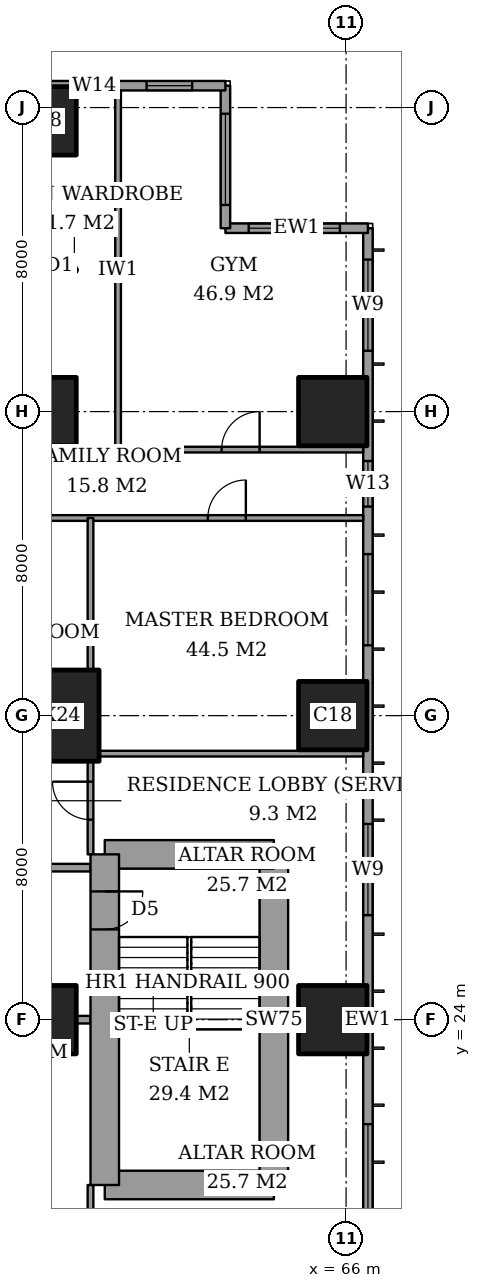
"""IFC4 building model, lengths in metres.
Left out: names, types, materials, properties, quantities, classifications, styles, units other than length and angle.
Written with IfcOpenShell. Run it as: python <this file> out.ifc"""

import sys

from ifc_helpers import new_model, si_unit, direction, frame, frame_2d, origin, origin_2d, place, context, subcontext, project, spatial, rectangle, extrude, element, fill, save


model = new_model("IFC4")
c1 = context("Model", 3, precision=1e-05, world=origin(), true_north=direction((0.0, 1.0)))
c2 = subcontext(c1, "Body", "Model", "MODEL_VIEW")
j1 = project(units=[si_unit("LENGTHUNIT", "METRE"), si_unit("PLANEANGLEUNIT", "RADIAN")], contexts=[c1])
p1 = place(None, origin())
s1 = spatial("IfcSite", under=j1, at=p1, CompositionType="ELEMENT")
p2 = place(p1, origin())
s2 = spatial("IfcBuilding", under=s1, at=p2, CompositionType="ELEMENT")
p3 = place(p2, frame((0.0, 0.0, 207.4)))
s3 = spatial("IfcBuildingStorey", under=s2, at=p3, CompositionType="ELEMENT", Elevation=207.4)
p4 = place(p3, frame((58.0, 24.0, 0.0), z_axis=(0.0, 0.0, 1.0), x_axis=(1.0, 0.0, 0.0)))
e1 = element("IfcColumn", 1, at=p4, inside=s3, PredefinedType="COLUMN", context=c2, shape_type="SweptSolid", body=[
    extrude(rectangle(XDim=1.8, YDim=1.8, at=origin_2d()), origin(), (0.0, 0.0, 1.0), 3.6),
])
p5 = place(p3, frame((58.0, 32.0, 0.0), z_axis=(0.0, 0.0, 1.0), x_axis=(1.0, 0.0, 0.0)))
e2 = element("IfcColumn", 2, at=p5, inside=s3, PredefinedType="COLUMN", context=c2, shape_type="SweptSolid", body=[
    extrude(rectangle(XDim=3.0, YDim=2.4, at=origin_2d()), origin(), (0.0, 0.0, 1.0), 3.6),
])
for number, where, z_axis, x_axis in (
    (3, (58.0, 40.0, 0.0), (0.0, 0.0, 1.0), (1.0, 0.0, 0.0)),
    (4, (58.0, 47.65, 0.0), (0.0, 0.0, 1.0), (1.0, 0.0, 0.0)),
    (5, (65.65, 24.0, 0.0), (0.0, 0.0, 1.0), (1.0, 0.0, 0.0)),
    (6, (65.65, 32.0, 0.0), (0.0, 0.0, 1.0), (1.0, 0.0, 0.0)),
    (7, (65.65, 40.0, 0.0), (0.0, 0.0, 1.0), (1.0, 0.0, 0.0)),
):
    element("IfcColumn", number, at=place(p3, frame(where, z_axis=z_axis, x_axis=x_axis)), inside=s3, PredefinedType="COLUMN", context=c2, shape_type="SweptSolid", body=[
        extrude(rectangle(XDim=1.8, YDim=1.8, at=origin_2d()), origin(), (0.0, 0.0, 1.0), 3.6),
    ])
p6 = place(p3, frame((59.65, 19.65, 0.0), z_axis=(0.0, 0.0, 1.0), x_axis=(1.0, 0.0, 0.0)))
e8 = element("IfcWall", 8, at=p6, inside=s3, PredefinedType="SHEAR", context=c2, shape_type="SweptSolid", body=[
    extrude(rectangle(XDim=4.45, YDim=0.75, at=frame_2d((2.225, 0.0))), origin(), (0.0, 0.0, 1.0), 3.6),
])
p7 = place(p3, frame((64.1, 19.65, 0.0), z_axis=(0.0, 0.0, 1.0), x_axis=(0.0, 1.0, 0.0)))
e9 = element("IfcWall", 9, at=p7, inside=s3, PredefinedType="SHEAR", context=c2, shape_type="SweptSolid", body=[
    extrude(rectangle(XDim=8.7, YDim=0.75, at=frame_2d((4.35, 0.0))), origin(), (0.0, 0.0, 1.0), 3.6),
])
p8 = place(p3, frame((64.1, 28.35, 0.0), z_axis=(0.0, 0.0, 1.0), x_axis=(-1.0, 0.0, 0.0)))
e10 = element("IfcWall", 10, at=p8, inside=s3, PredefinedType="SHEAR", context=c2, shape_type="SweptSolid", body=[
    extrude(rectangle(XDim=4.45, YDim=0.75, at=frame_2d((2.225, 0.0))), origin(), (0.0, 0.0, 1.0), 3.6),
])
p9 = place(p3, frame((59.65, 28.35, 0.0), z_axis=(0.0, 0.0, 1.0), x_axis=(0.0, -1.0, 0.0)))
e11 = element("IfcWall", 11, at=p9, inside=s3, PredefinedType="SHEAR", context=c2, shape_type="SweptSolid", body=[
    extrude(rectangle(XDim=8.7, YDim=0.75, at=frame_2d((4.35, 0.0))), origin(), (0.0, 0.0, 1.0), 3.6),
])
p10 = place(p9, frame((0.975, 0.0, 0.0)))
e12 = element("IfcOpeningElement", 12, at=p10, cuts=e11, PredefinedType="OPENING", context=c2, shape_type="SweptSolid", body=[
    extrude(rectangle(XDim=1.0, YDim=2.1, at=frame_2d((0.5, 1.05))), frame((0.0, 0.385, 0.0), z_axis=(0.0, -1.0, 0.0), x_axis=(1.0, 0.0, 0.0)), (0.0, 0.0, 1.0), 0.77),
])
p11 = place(p3, frame((66.575, 3.175, 0.0), z_axis=(0.0, 0.0, 1.0), x_axis=(0.0, 1.0, 0.0)))
e13 = element("IfcWall", 13, at=p11, inside=s3, PredefinedType="SOLIDWALL", context=c2, shape_type="SweptSolid", body=[
    extrude(rectangle(XDim=41.65, YDim=0.25, at=frame_2d((20.825, 0.0))), origin(), (0.0, 0.0, 1.0), 3.6),
])
p12 = place(p11, frame((0.825, 0.0, 0.2)))
e14 = element("IfcOpeningElement", 14, at=p12, cuts=e13, PredefinedType="OPENING", context=c2, shape_type="SweptSolid", body=[
    extrude(rectangle(XDim=2.4, YDim=2.4, at=frame_2d((1.2, 1.2))), frame((0.0, 0.135, 0.0), z_axis=(0.0, -1.0, 0.0), x_axis=(1.0, 0.0, 0.0)), (0.0, 0.0, 1.0), 0.27),
])
p13 = place(p11, frame((6.6, 0.0, 0.2)))
e15 = element("IfcOpeningElement", 15, at=p13, cuts=e13, PredefinedType="OPENING", context=c2, shape_type="SweptSolid", body=[
    extrude(rectangle(XDim=1.2, YDim=2.4, at=frame_2d((0.6, 1.2))), frame((0.0, 0.135, 0.0), z_axis=(0.0, -1.0, 0.0), x_axis=(1.0, 0.0, 0.0)), (0.0, 0.0, 1.0), 0.27),
])
p14 = place(p11, frame((8.775, 0.0, 0.2)))
e16 = element("IfcOpeningElement", 16, at=p14, cuts=e13, PredefinedType="OPENING", context=c2, shape_type="SweptSolid", body=[
    extrude(rectangle(XDim=2.4, YDim=2.4, at=frame_2d((1.2, 1.2))), frame((0.0, 0.135, 0.0), z_axis=(0.0, -1.0, 0.0), x_axis=(1.0, 0.0, 0.0)), (0.0, 0.0, 1.0), 0.27),
])
p15 = place(p11, frame((15.675, 0.0, 0.2)))
e17 = element("IfcOpeningElement", 17, at=p15, cuts=e13, PredefinedType="OPENING", context=c2, shape_type="SweptSolid", body=[
    extrude(rectangle(XDim=2.4, YDim=2.4, at=frame_2d((1.2, 1.2))), frame((0.0, 0.135, 0.0), z_axis=(0.0, -1.0, 0.0), x_axis=(1.0, 0.0, 0.0)), (0.0, 0.0, 1.0), 0.27),
])
p16 = place(p11, frame((23.575, 0.0, 0.2)))
e18 = element("IfcOpeningElement", 18, at=p16, cuts=e13, PredefinedType="OPENING", context=c2, shape_type="SweptSolid", body=[
    extrude(rectangle(XDim=2.4, YDim=2.4, at=frame_2d((1.2, 1.2))), frame((0.0, 0.135, 0.0), z_axis=(0.0, -1.0, 0.0), x_axis=(1.0, 0.0, 0.0)), (0.0, 0.0, 1.0), 0.27),
])
p17 = place(p11, frame((30.675, 0.0, 0.2)))
e19 = element("IfcOpeningElement", 19, at=p17, cuts=e13, PredefinedType="OPENING", context=c2, shape_type="SweptSolid", body=[
    extrude(rectangle(XDim=2.4, YDim=2.4, at=frame_2d((1.2, 1.2))), frame((0.0, 0.135, 0.0), z_axis=(0.0, -1.0, 0.0), x_axis=(1.0, 0.0, 0.0)), (0.0, 0.0, 1.0), 0.27),
])
p18 = place(p11, frame((34.325, 0.0, 0.2)))
e20 = element("IfcOpeningElement", 20, at=p18, cuts=e13, PredefinedType="OPENING", context=c2, shape_type="SweptSolid", body=[
    extrude(rectangle(XDim=1.2, YDim=2.4, at=frame_2d((0.6, 1.2))), frame((0.0, 0.135, 0.0), z_axis=(0.0, -1.0, 0.0), x_axis=(1.0, 0.0, 0.0)), (0.0, 0.0, 1.0), 0.27),
])
p19 = place(p11, frame((38.425, 0.0, 0.2)))
e21 = element("IfcOpeningElement", 21, at=p19, cuts=e13, PredefinedType="OPENING", context=c2, shape_type="SweptSolid", body=[
    extrude(rectangle(XDim=2.4, YDim=2.4, at=frame_2d((1.2, 1.2))), frame((0.0, 0.135, 0.0), z_axis=(0.0, -1.0, 0.0), x_axis=(1.0, 0.0, 0.0)), (0.0, 0.0, 1.0), 0.27),
])
p20 = place(p3, frame((66.575, 44.825, 0.0), z_axis=(0.0, 0.0, 1.0), x_axis=(-1.0, 0.0, 0.0)))
e22 = element("IfcWall", 22, at=p20, inside=s3, PredefinedType="SOLIDWALL", context=c2, shape_type="SweptSolid", body=[
    extrude(rectangle(XDim=3.75, YDim=0.25, at=frame_2d((1.875, 0.0))), origin(), (0.0, 0.0, 1.0), 3.6),
])
p21 = place(p20, frame((0.738, 0.0, 0.2)))
e23 = element("IfcOpeningElement", 23, at=p21, cuts=e22, PredefinedType="OPENING", context=c2, shape_type="SweptSolid", body=[
    extrude(rectangle(XDim=2.4, YDim=2.4, at=frame_2d((1.2, 1.2))), frame((0.0, 0.135, 0.0), z_axis=(0.0, -1.0, 0.0), x_axis=(1.0, 0.0, 0.0)), (0.0, 0.0, 1.0), 0.27),
])
p22 = place(p3, frame((62.825, 44.825, 0.0), z_axis=(0.0, 0.0, 1.0), x_axis=(0.0, 1.0, 0.0)))
e24 = element("IfcWall", 24, at=p22, inside=s3, PredefinedType="SOLIDWALL", context=c2, shape_type="SweptSolid", body=[
    extrude(rectangle(XDim=3.75, YDim=0.25, at=frame_2d((1.875, 0.0))), origin(), (0.0, 0.0, 1.0), 3.6),
])
p23 = place(p22, frame((0.613, 0.0, 0.2)))
e25 = element("IfcOpeningElement", 25, at=p23, cuts=e24, PredefinedType="OPENING", context=c2, shape_type="SweptSolid", body=[
    extrude(rectangle(XDim=2.4, YDim=2.4, at=frame_2d((1.2, 1.2))), frame((0.0, 0.135, 0.0), z_axis=(0.0, -1.0, 0.0), x_axis=(1.0, 0.0, 0.0)), (0.0, 0.0, 1.0), 0.27),
])
p24 = place(p3, frame((62.825, 48.575, 0.0), z_axis=(0.0, 0.0, 1.0), x_axis=(-1.0, 0.0, 0.0)))
e26 = element("IfcWall", 26, at=p24, inside=s3, PredefinedType="SOLIDWALL", context=c2, shape_type="SweptSolid", body=[
    extrude(rectangle(XDim=21.4, YDim=0.25, at=frame_2d((10.7, 0.0))), origin(), (0.0, 0.0, 1.0), 3.6),
])
p25 = place(p24, frame((0.875, 0.0, 0.2)))
e27 = element("IfcOpeningElement", 27, at=p25, cuts=e26, PredefinedType="OPENING", context=c2, shape_type="SweptSolid", body=[
    extrude(rectangle(XDim=1.2, YDim=2.4, at=frame_2d((0.6, 1.2))), frame((0.0, 0.135, 0.0), z_axis=(0.0, -1.0, 0.0), x_axis=(1.0, 0.0, 0.0)), (0.0, 0.0, 1.0), 0.27),
])
p26 = place(p24, frame((3.15, 0.0, 0.2)))
e28 = element("IfcOpeningElement", 28, at=p26, cuts=e26, PredefinedType="OPENING", context=c2, shape_type="SweptSolid", body=[
    extrude(rectangle(XDim=0.6, YDim=2.4, at=frame_2d((0.3, 1.2))), frame((0.0, 0.135, 0.0), z_axis=(0.0, -1.0, 0.0), x_axis=(1.0, 0.0, 0.0)), (0.0, 0.0, 1.0), 0.27),
])
p27 = place(p24, frame((6.575, 0.0, 0.2)))
e29 = element("IfcOpeningElement", 29, at=p27, cuts=e26, PredefinedType="OPENING", context=c2, shape_type="SweptSolid", body=[
    extrude(rectangle(XDim=2.4, YDim=2.4, at=frame_2d((1.2, 1.2))), frame((0.0, 0.135, 0.0), z_axis=(0.0, -1.0, 0.0), x_axis=(1.0, 0.0, 0.0)), (0.0, 0.0, 1.0), 0.27),
])
p28 = place(p24, frame((10.275, 0.0, 0.2)))
e30 = element("IfcOpeningElement", 30, at=p28, cuts=e26, PredefinedType="OPENING", context=c2, shape_type="SweptSolid", body=[
    extrude(rectangle(XDim=1.2, YDim=2.4, at=frame_2d((0.6, 1.2))), frame((0.0, 0.135, 0.0), z_axis=(0.0, -1.0, 0.0), x_axis=(1.0, 0.0, 0.0)), (0.0, 0.0, 1.0), 0.27),
])
p29 = place(p24, frame((14.425, 0.0, 0.2)))
e31 = element("IfcOpeningElement", 31, at=p29, cuts=e26, PredefinedType="OPENING", context=c2, shape_type="SweptSolid", body=[
    extrude(rectangle(XDim=2.4, YDim=2.4, at=frame_2d((1.2, 1.2))), frame((0.0, 0.135, 0.0), z_axis=(0.0, -1.0, 0.0), x_axis=(1.0, 0.0, 0.0)), (0.0, 0.0, 1.0), 0.27),
])
p30 = place(p24, frame((17.9, 0.0, 0.2)))
e32 = element("IfcOpeningElement", 32, at=p30, cuts=e26, PredefinedType="OPENING", context=c2, shape_type="SweptSolid", body=[
    extrude(rectangle(XDim=1.2, YDim=2.4, at=frame_2d((0.6, 1.2))), frame((0.0, 0.135, 0.0), z_axis=(0.0, -1.0, 0.0), x_axis=(1.0, 0.0, 0.0)), (0.0, 0.0, 1.0), 0.27),
])
p31 = place(p3, frame((58.9, 24.0, 0.0), z_axis=(0.0, 0.0, 1.0), x_axis=(1.0, 0.0, 0.0)))
e33 = element("IfcWall", 33, at=p31, inside=s3, PredefinedType="PARTITIONING", context=c2, shape_type="SweptSolid", body=[
    extrude(rectangle(XDim=0.375, YDim=0.2, at=frame_2d((0.188, 0.0))), origin(), (0.0, 0.0, 1.0), 3.35),
])
p32 = place(p3, frame((42.0, 28.0, 0.0), z_axis=(0.0, 0.0, 1.0), x_axis=(1.0, 0.0, 0.0)))
e34 = element("IfcWall", 34, at=p32, inside=s3, PredefinedType="PARTITIONING", context=c2, shape_type="SweptSolid", body=[
    extrude(rectangle(XDim=17.275, YDim=0.2, at=frame_2d((8.637, 0.0))), origin(), (0.0, 0.0, 1.0), 3.35),
])
p33 = place(p32, frame((9.4, 0.0, 0.0)))
e35 = element("IfcOpeningElement", 35, at=p33, cuts=e34, PredefinedType="OPENING", context=c2, shape_type="SweptSolid", body=[
    extrude(rectangle(XDim=1.2, YDim=2.4, at=frame_2d((0.6, 1.2))), frame((0.0, 0.11, 0.0), z_axis=(0.0, -1.0, 0.0), x_axis=(1.0, 0.0, 0.0)), (0.0, 0.0, 1.0), 0.22),
])
p34 = place(p3, frame((59.5, 31.0, 0.0), z_axis=(0.0, 0.0, 1.0), x_axis=(1.0, 0.0, 0.0)))
e36 = element("IfcWall", 36, at=p34, inside=s3, PredefinedType="PARTITIONING", context=c2, shape_type="SweptSolid", body=[
    extrude(rectangle(XDim=6.95, YDim=0.15, at=frame_2d((3.475, 0.0))), origin(), (0.0, 0.0, 1.0), 3.35),
])
p35 = place(p3, frame((41.439, 37.2, 0.0), z_axis=(0.0, 0.0, 1.0), x_axis=(1.0, 0.0, 0.0)))
e37 = element("IfcWall", 37, at=p35, inside=s3, PredefinedType="PARTITIONING", context=c2, shape_type="SweptSolid", body=[
    extrude(rectangle(XDim=25.011, YDim=0.15, at=frame_2d((12.505, 0.0))), origin(), (0.0, 0.0, 1.0), 3.35),
])
p36 = place(p35, frame((10.761, 0.0, 0.0)))
e38 = element("IfcOpeningElement", 38, at=p36, cuts=e37, PredefinedType="OPENING", context=c2, shape_type="SweptSolid", body=[
    extrude(rectangle(XDim=1.0, YDim=2.1, at=frame_2d((0.5, 1.05))), frame((0.0, 0.085, 0.0), z_axis=(0.0, -1.0, 0.0), x_axis=(1.0, 0.0, 0.0)), (0.0, 0.0, 1.0), 0.17),
])
p37 = place(p35, frame((20.924, 0.0, 0.0)))
e39 = element("IfcOpeningElement", 39, at=p37, cuts=e37, PredefinedType="OPENING", context=c2, shape_type="SweptSolid", body=[
    extrude(rectangle(XDim=1.0, YDim=2.1, at=frame_2d((0.5, 1.05))), frame((0.0, 0.085, 0.0), z_axis=(0.0, -1.0, 0.0), x_axis=(1.0, 0.0, 0.0)), (0.0, 0.0, 1.0), 0.17),
])
p38 = place(p35, frame((15.749, 0.0, 0.0)))
e40 = element("IfcOpeningElement", 40, at=p38, cuts=e37, PredefinedType="OPENING", context=c2, shape_type="SweptSolid", body=[
    extrude(rectangle(XDim=0.9, YDim=2.1, at=frame_2d((0.45, 1.05))), frame((0.0, 0.085, 0.0), z_axis=(0.0, -1.0, 0.0), x_axis=(1.0, 0.0, 0.0)), (0.0, 0.0, 1.0), 0.17),
])
p39 = place(p35, frame((12.961, 0.0, 0.0)))
e41 = element("IfcOpeningElement", 41, at=p39, cuts=e37, PredefinedType="OPENING", context=c2, shape_type="SweptSolid", body=[
    extrude(rectangle(XDim=1.0, YDim=2.1, at=frame_2d((0.5, 1.05))), frame((0.0, 0.085, 0.0), z_axis=(0.0, -1.0, 0.0), x_axis=(1.0, 0.0, 0.0)), (0.0, 0.0, 1.0), 0.17),
])
p40 = place(p35, frame((7.911, 0.0, 0.0)))
e42 = element("IfcOpeningElement", 42, at=p40, cuts=e37, PredefinedType="OPENING", context=c2, shape_type="SweptSolid", body=[
    extrude(rectangle(XDim=0.9, YDim=2.1, at=frame_2d((0.45, 1.05))), frame((0.0, 0.085, 0.0), z_axis=(0.0, -1.0, 0.0), x_axis=(1.0, 0.0, 0.0)), (0.0, 0.0, 1.0), 0.17),
])
p41 = place(p35, frame((2.836, 0.0, 0.0)))
e43 = element("IfcOpeningElement", 43, at=p41, cuts=e37, PredefinedType="OPENING", context=c2, shape_type="SweptSolid", body=[
    extrude(rectangle(XDim=1.0, YDim=2.1, at=frame_2d((0.5, 1.05))), frame((0.0, 0.085, 0.0), z_axis=(0.0, -1.0, 0.0), x_axis=(1.0, 0.0, 0.0)), (0.0, 0.0, 1.0), 0.17),
])
p42 = place(p3, frame((51.2, 39.0, 0.0), z_axis=(0.0, 0.0, 1.0), x_axis=(1.0, 0.0, 0.0)))
e44 = element("IfcWall", 44, at=p42, inside=s3, PredefinedType="PARTITIONING", context=c2, shape_type="SweptSolid", body=[
    extrude(rectangle(XDim=15.25, YDim=0.15, at=frame_2d((7.625, 0.0))), origin(), (0.0, 0.0, 1.0), 3.35),
])
p43 = place(p42, frame((11.525, 0.0, 0.0)))
e45 = element("IfcOpeningElement", 45, at=p43, cuts=e44, PredefinedType="OPENING", context=c2, shape_type="SweptSolid", body=[
    extrude(rectangle(XDim=1.0, YDim=2.1, at=frame_2d((0.5, 1.05))), frame((0.0, 0.085, 0.0), z_axis=(0.0, -1.0, 0.0), x_axis=(1.0, 0.0, 0.0)), (0.0, 0.0, 1.0), 0.17),
])
p44 = place(p42, frame((4.75, 0.0, 0.0)))
e46 = element("IfcOpeningElement", 46, at=p44, cuts=e44, PredefinedType="OPENING", context=c2, shape_type="SweptSolid", body=[
    extrude(rectangle(XDim=1.0, YDim=2.1, at=frame_2d((0.5, 1.05))), frame((0.0, 0.085, 0.0), z_axis=(0.0, -1.0, 0.0), x_axis=(1.0, 0.0, 0.0)), (0.0, 0.0, 1.0), 0.17),
])
p45 = place(p42, frame((0.4, 0.0, 0.0)))
e47 = element("IfcOpeningElement", 47, at=p45, cuts=e44, PredefinedType="OPENING", context=c2, shape_type="SweptSolid", body=[
    extrude(rectangle(XDim=1.0, YDim=2.1, at=frame_2d((0.5, 1.05))), frame((0.0, 0.085, 0.0), z_axis=(0.0, -1.0, 0.0), x_axis=(1.0, 0.0, 0.0)), (0.0, 0.0, 1.0), 0.17),
])
p46 = place(p3, frame((59.275, 17.2, 0.0), z_axis=(0.0, 0.0, 1.0), x_axis=(0.0, 1.0, 0.0)))
e48 = element("IfcWall", 48, at=p46, inside=s3, PredefinedType="PARTITIONING", context=c2, shape_type="SweptSolid", body=[
    extrude(rectangle(XDim=2.45, YDim=0.15, at=frame_2d((1.225, 0.0))), origin(), (0.0, 0.0, 1.0), 3.35),
])
p47 = place(p46, frame((0.538, 0.0, 0.0)))
e49 = element("IfcOpeningElement", 49, at=p47, cuts=e48, PredefinedType="OPENING", context=c2, shape_type="SweptSolid", body=[
    extrude(rectangle(XDim=1.0, YDim=2.1, at=frame_2d((0.5, 1.05))), frame((0.0, 0.085, 0.0), z_axis=(0.0, -1.0, 0.0), x_axis=(1.0, 0.0, 0.0)), (0.0, 0.0, 1.0), 0.17),
])
p48 = place(p3, frame((59.275, 28.35, 0.0), z_axis=(0.0, 0.0, 1.0), x_axis=(0.0, 1.0, 0.0)))
e50 = element("IfcWall", 50, at=p48, inside=s3, PredefinedType="PARTITIONING", context=c2, shape_type="SweptSolid", body=[
    extrude(rectangle(XDim=2.45, YDim=0.15, at=frame_2d((1.225, 0.0))), origin(), (0.0, 0.0, 1.0), 3.35),
])
p49 = place(p48, frame((0.913, 0.0, 0.0)))
e51 = element("IfcOpeningElement", 51, at=p49, cuts=e50, PredefinedType="OPENING", context=c2, shape_type="SweptSolid", body=[
    extrude(rectangle(XDim=1.0, YDim=2.1, at=frame_2d((0.5, 1.05))), frame((0.0, 0.085, 0.0), z_axis=(0.0, -1.0, 0.0), x_axis=(1.0, 0.0, 0.0)), (0.0, 0.0, 1.0), 0.17),
])
p50 = place(p3, frame((59.275, 33.2, 0.0), z_axis=(0.0, 0.0, 1.0), x_axis=(0.0, 1.0, 0.0)))
e52 = element("IfcWall", 52, at=p50, inside=s3, PredefinedType="PARTITIONING", context=c2, shape_type="SweptSolid", body=[
    extrude(rectangle(XDim=4.0, YDim=0.15, at=frame_2d((2.0, 0.0))), origin(), (0.0, 0.0, 1.0), 3.35),
])
p51 = place(p3, frame((60.0, 39.0, 0.0), z_axis=(0.0, 0.0, 1.0), x_axis=(0.0, 1.0, 0.0)))
e53 = element("IfcWall", 53, at=p51, inside=s3, PredefinedType="PARTITIONING", context=c2, shape_type="SweptSolid", body=[
    extrude(rectangle(XDim=9.45, YDim=0.15, at=frame_2d((4.725, 0.0))), origin(), (0.0, 0.0, 1.0), 3.35),
])
p52 = place(p15, origin())
e54 = element("IfcWindow", 54, at=p52, inside=s3, PartitioningType="SINGLE_PANEL", PredefinedType="WINDOW", context=c2, shape_type="SweptSolid", body=[
    extrude(rectangle(XDim=2.4, YDim=2.4, at=frame_2d((1.2, 1.2))), frame((0.0, 0.03, 0.0), z_axis=(0.0, -1.0, 0.0), x_axis=(1.0, 0.0, 0.0)), (0.0, 0.0, 1.0), 0.06),
])
fill(e17, e54)
p53 = place(p16, origin())
e55 = element("IfcWindow", 55, at=p53, inside=s3, PartitioningType="SINGLE_PANEL", PredefinedType="WINDOW", context=c2, shape_type="SweptSolid", body=[
    extrude(rectangle(XDim=2.4, YDim=2.4, at=frame_2d((1.2, 1.2))), frame((0.0, 0.03, 0.0), z_axis=(0.0, -1.0, 0.0), x_axis=(1.0, 0.0, 0.0)), (0.0, 0.0, 1.0), 0.06),
])
fill(e18, e55)
p54 = place(p17, origin())
e56 = element("IfcWindow", 56, at=p54, inside=s3, PartitioningType="SINGLE_PANEL", PredefinedType="WINDOW", context=c2, shape_type="SweptSolid", body=[
    extrude(rectangle(XDim=2.4, YDim=2.4, at=frame_2d((1.2, 1.2))), frame((0.0, 0.03, 0.0), z_axis=(0.0, -1.0, 0.0), x_axis=(1.0, 0.0, 0.0)), (0.0, 0.0, 1.0), 0.06),
])
fill(e19, e56)
p55 = place(p18, origin())
e57 = element("IfcWindow", 57, at=p55, inside=s3, PartitioningType="SINGLE_PANEL", PredefinedType="WINDOW", context=c2, shape_type="SweptSolid", body=[
    extrude(rectangle(XDim=1.2, YDim=2.4, at=frame_2d((0.6, 1.2))), frame((0.0, 0.03, 0.0), z_axis=(0.0, -1.0, 0.0), x_axis=(1.0, 0.0, 0.0)), (0.0, 0.0, 1.0), 0.06),
])
fill(e20, e57)
p56 = place(p19, origin())
e58 = element("IfcWindow", 58, at=p56, inside=s3, PartitioningType="SINGLE_PANEL", PredefinedType="WINDOW", context=c2, shape_type="SweptSolid", body=[
    extrude(rectangle(XDim=2.4, YDim=2.4, at=frame_2d((1.2, 1.2))), frame((0.0, 0.03, 0.0), z_axis=(0.0, -1.0, 0.0), x_axis=(1.0, 0.0, 0.0)), (0.0, 0.0, 1.0), 0.06),
])
fill(e21, e58)
p57 = place(p21, origin())
e59 = element("IfcWindow", 59, at=p57, inside=s3, PartitioningType="SINGLE_PANEL", PredefinedType="WINDOW", context=c2, shape_type="SweptSolid", body=[
    extrude(rectangle(XDim=2.4, YDim=2.4, at=frame_2d((1.2, 1.2))), frame((0.0, 0.03, 0.0), z_axis=(0.0, -1.0, 0.0), x_axis=(1.0, 0.0, 0.0)), (0.0, 0.0, 1.0), 0.06),
])
fill(e23, e59)
p58 = place(p23, origin())
e60 = element("IfcWindow", 60, at=p58, inside=s3, PartitioningType="SINGLE_PANEL", PredefinedType="WINDOW", context=c2, shape_type="SweptSolid", body=[
    extrude(rectangle(XDim=2.4, YDim=2.4, at=frame_2d((1.2, 1.2))), frame((0.0, 0.03, 0.0), z_axis=(0.0, -1.0, 0.0), x_axis=(1.0, 0.0, 0.0)), (0.0, 0.0, 1.0), 0.06),
])
fill(e25, e60)
p59 = place(p25, origin())
e61 = element("IfcWindow", 61, at=p59, inside=s3, PartitioningType="SINGLE_PANEL", PredefinedType="WINDOW", context=c2, shape_type="SweptSolid", body=[
    extrude(rectangle(XDim=1.2, YDim=2.4, at=frame_2d((0.6, 1.2))), frame((0.0, 0.03, 0.0), z_axis=(0.0, -1.0, 0.0), x_axis=(1.0, 0.0, 0.0)), (0.0, 0.0, 1.0), 0.06),
])
fill(e27, e61)
p60 = place(p26, origin())
e62 = element("IfcWindow", 62, at=p60, inside=s3, PartitioningType="SINGLE_PANEL", PredefinedType="WINDOW", context=c2, shape_type="SweptSolid", body=[
    extrude(rectangle(XDim=0.6, YDim=2.4, at=frame_2d((0.3, 1.2))), frame((0.0, 0.03, 0.0), z_axis=(0.0, -1.0, 0.0), x_axis=(1.0, 0.0, 0.0)), (0.0, 0.0, 1.0), 0.06),
])
fill(e28, e62)
p61 = place(p43, origin())
e63 = element("IfcDoor", 63, at=p61, inside=s3, OperationType="SINGLE_SWING_LEFT", PredefinedType="DOOR", context=c2, shape_type="SweptSolid", body=[
    extrude(rectangle(XDim=1.0, YDim=2.1, at=frame_2d((0.5, 1.05))), frame((0.0, 0.025, 0.0), z_axis=(0.0, -1.0, 0.0), x_axis=(1.0, 0.0, 0.0)), (0.0, 0.0, 1.0), 0.05),
])
fill(e45, e63)
p62 = place(p37, origin())
e64 = element("IfcDoor", 64, at=p62, inside=s3, OperationType="SINGLE_SWING_LEFT", PredefinedType="DOOR", context=c2, shape_type="SweptSolid", body=[
    extrude(rectangle(XDim=1.0, YDim=2.1, at=frame_2d((0.5, 1.05))), frame((0.0, 0.025, 0.0), z_axis=(0.0, -1.0, 0.0), x_axis=(1.0, 0.0, 0.0)), (0.0, 0.0, 1.0), 0.05),
])
fill(e39, e64)
p63 = place(p49, origin())
e65 = element("IfcDoor", 65, at=p63, inside=s3, OperationType="SINGLE_SWING_LEFT", PredefinedType="DOOR", context=c2, shape_type="SweptSolid", body=[
    extrude(rectangle(XDim=1.0, YDim=2.1, at=frame_2d((0.5, 1.05))), frame((0.0, 0.025, 0.0), z_axis=(0.0, -1.0, 0.0), x_axis=(1.0, 0.0, 0.0)), (0.0, 0.0, 1.0), 0.05),
])
fill(e51, e65)
p64 = place(p10, origin())
e66 = element("IfcDoor", 66, at=p64, inside=s3, OperationType="SINGLE_SWING_RIGHT", PredefinedType="DOOR", context=c2, shape_type="SweptSolid", body=[
    extrude(rectangle(XDim=1.0, YDim=2.1, at=frame_2d((0.5, 1.05))), frame((0.0, 0.025, 0.0), z_axis=(0.0, -1.0, 0.0), x_axis=(1.0, 0.0, 0.0)), (0.0, 0.0, 1.0), 0.05),
])
fill(e12, e66)
save(model, sys.argv[1])
